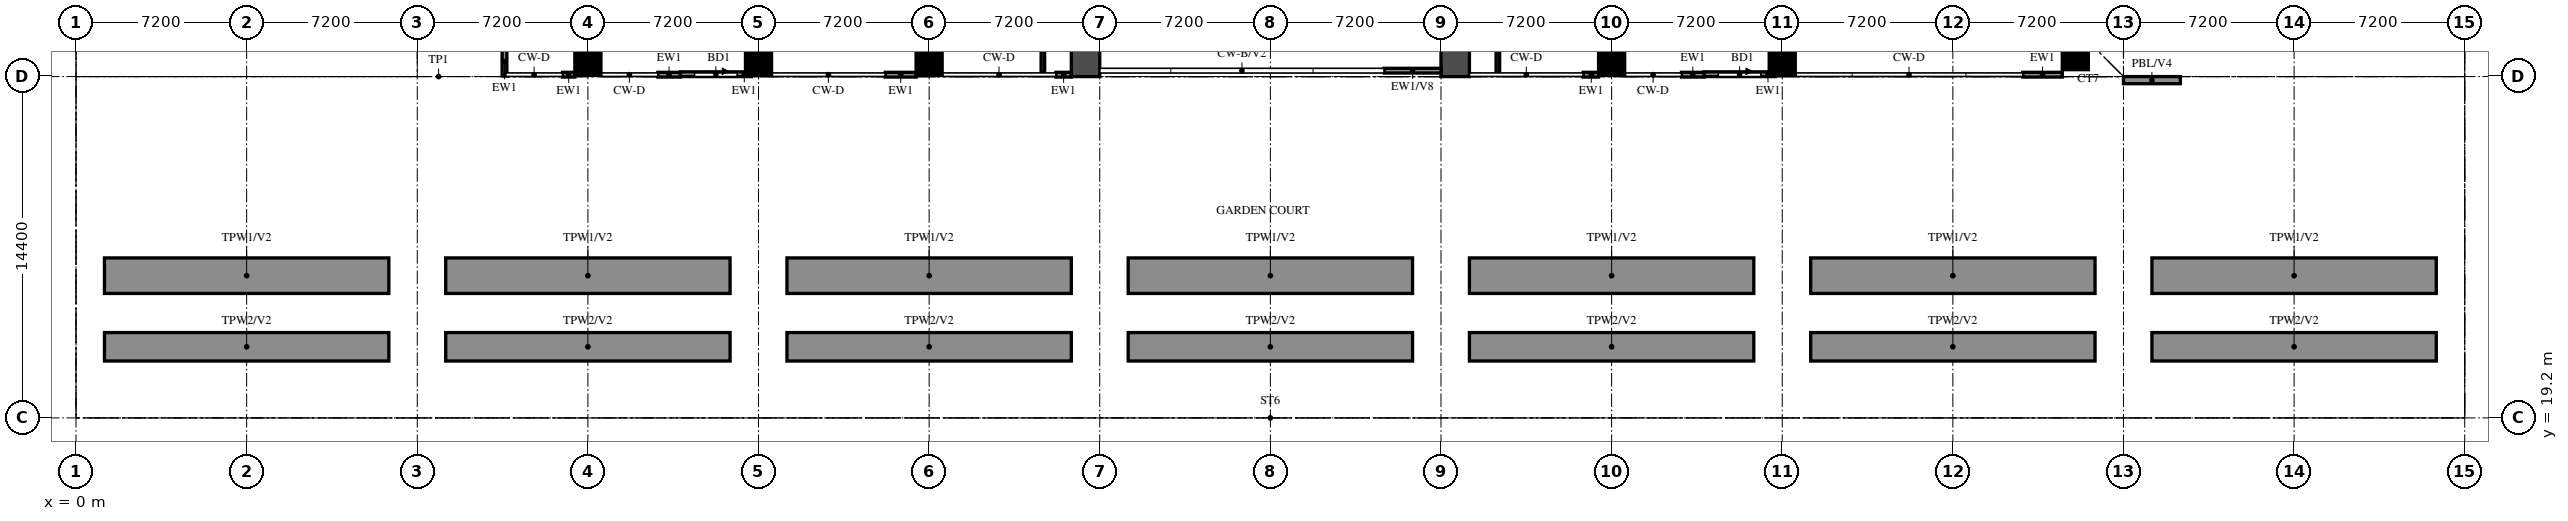
"""IFC4 building model, lengths in metres.
Left out: names, types, materials, properties, quantities, classifications, styles, units other than length and angle.
Written with IfcOpenShell. Run it as: python <this file> out.ifc"""

import sys

from ifc_helpers import new_model, si_unit, direction, frame, frame_2d, origin, origin_2d, place, context, subcontext, project, spatial, rectangle, extrude, source, transform, mapped, element, fill, save


model = new_model("IFC4")
c1 = context("Model", 3, precision=1e-05, world=origin(), true_north=direction((0.0, 1.0)))
c2 = subcontext(c1, "Body", "Model", "MODEL_VIEW")
j1 = project(units=[si_unit("LENGTHUNIT", "METRE"), si_unit("PLANEANGLEUNIT", "RADIAN")], contexts=[c1])
p1 = place(None, origin())
s1 = spatial("IfcSite", under=j1, at=p1, CompositionType="ELEMENT")
p2 = place(p1, origin())
s2 = spatial("IfcBuilding", under=s1, at=p2, CompositionType="ELEMENT")
p3 = place(p2, frame((0.0, 0.0, 27.0)))
s3 = spatial("IfcBuildingStorey", under=s2, at=p3, CompositionType="ELEMENT", Elevation=27.0)
m1 = source(origin(), c2, "Body", "SweptSolid", [
    extrude(rectangle(XDim=1.1, YDim=1.1, at=origin_2d()), origin(), (0.0, 0.0, 1.0), 3.18),
])
for number, where, z_axis, x_axis in (
    (1, (21.6, 34.2, 0.0), (0.0, 0.0, 1.0), (1.0, 0.0, 0.0)),
    (2, (28.8, 34.2, 0.0), (0.0, 0.0, 1.0), (1.0, 0.0, 0.0)),
    (3, (36.0, 34.2, 0.0), (0.0, 0.0, 1.0), (1.0, 0.0, 0.0)),
    (4, (64.8, 34.2, 0.0), (0.0, 0.0, 1.0), (1.0, 0.0, 0.0)),
    (5, (72.0, 34.2, 0.0), (0.0, 0.0, 1.0), (1.0, 0.0, 0.0)),
    (6, (84.367, 34.442, 0.0), (0.0, 0.0, 1.0), (1.0, 0.0, 0.0)),
):
    element("IfcColumn", number, at=place(p3, frame(where, z_axis=z_axis, x_axis=x_axis)), inside=s3, PredefinedType="COLUMN", context=c2, shape_type="MappedRepresentation", body=[
        mapped(m1, transform((0.0, 0.0, 0.0))),
    ])
for number, where, z_axis, x_axis in (
    (7, (42.6, 33.6, 0.0), (0.0, 0.0, 1.0), (0.0, 1.0, 0.0)),
    (8, (58.2, 33.6, 0.0), (0.0, 0.0, 1.0), (0.0, 1.0, 0.0)),
):
    element("IfcWall", number, at=place(p3, frame(where, z_axis=z_axis, x_axis=x_axis)), inside=s3, PredefinedType="SHEAR", context=c2, shape_type="SweptSolid", body=[
        extrude(rectangle(XDim=3.6, YDim=1.2, at=frame_2d((1.8, 0.0))), origin(), (0.0, 0.0, 1.0), 3.18),
    ])
p4 = place(p3, frame((18.08, 34.83, 0.0), z_axis=(0.0, 0.0, 1.0), x_axis=(0.0, -1.0, 0.0)))
e9 = element("IfcWall", 9, at=p4, inside=s3, PredefinedType="SOLIDWALL", context=c2, shape_type="SweptSolid", body=[
    extrude(rectangle(XDim=1.2, YDim=0.2, at=frame_2d((0.6, 0.0))), origin(), (0.0, 0.0, 1.0), 3.18),
])
p5 = place(p3, frame((25.5, 33.7, 0.0), z_axis=(0.0, 0.0, 1.0), x_axis=(1.0, 0.0, 0.0)))
e10 = element("IfcWall", 10, at=p5, inside=s3, PredefinedType="SOLIDWALL", context=c2, shape_type="SweptSolid", body=[
    extrude(rectangle(XDim=3.0, YDim=0.2, at=frame_2d((1.5, 0.0))), origin(), (0.0, 0.0, 1.0), 3.18),
])
p6 = place(p5, frame((0.6, 0.0, 0.0)))
e11 = element("IfcOpeningElement", 11, at=p6, cuts=e10, PredefinedType="OPENING", context=c2, shape_type="SweptSolid", body=[
    extrude(rectangle(XDim=1.8, YDim=2.4, at=frame_2d((0.9, 1.2))), frame((0.0, 0.11, 0.0), z_axis=(0.0, -1.0, 0.0), x_axis=(1.0, 0.0, 0.0)), (0.0, 0.0, 1.0), 0.22),
])
p7 = place(p3, frame((68.7, 33.7, 0.0), z_axis=(0.0, 0.0, 1.0), x_axis=(1.0, 0.0, 0.0)))
e12 = element("IfcWall", 12, at=p7, inside=s3, PredefinedType="SOLIDWALL", context=c2, shape_type="SweptSolid", body=[
    extrude(rectangle(XDim=3.0, YDim=0.2, at=frame_2d((1.5, 0.0))), origin(), (0.0, 0.0, 1.0), 3.18),
])
p8 = place(p7, frame((0.6, 0.0, 0.0)))
e13 = element("IfcOpeningElement", 13, at=p8, cuts=e12, PredefinedType="OPENING", context=c2, shape_type="SweptSolid", body=[
    extrude(rectangle(XDim=1.8, YDim=2.4, at=frame_2d((0.9, 1.2))), frame((0.0, 0.11, 0.0), z_axis=(0.0, -1.0, 0.0), x_axis=(1.0, 0.0, 0.0)), (0.0, 0.0, 1.0), 0.22),
])
p9 = place(p3, frame((20.53, 33.68, 0.0), z_axis=(0.0, 0.0, 1.0), x_axis=(1.0, 0.0, 0.0)))
e14 = element("IfcWall", 14, at=p9, inside=s3, PredefinedType="SOLIDWALL", context=c2, shape_type="SweptSolid", body=[
    extrude(rectangle(XDim=0.52, YDim=0.2, at=frame_2d((0.26, 0.0))), origin(), (0.0, 0.0, 1.0), 3.18),
])
p10 = place(p3, frame((24.55, 33.68, 0.0), z_axis=(0.0, 0.0, 1.0), x_axis=(1.0, 0.0, 0.0)))
e15 = element("IfcWall", 15, at=p10, inside=s3, PredefinedType="SOLIDWALL", context=c2, shape_type="SweptSolid", body=[
    extrude(rectangle(XDim=0.95, YDim=0.2, at=frame_2d((0.475, 0.0))), origin(), (0.0, 0.0, 1.0), 3.18),
])
p11 = place(p3, frame((34.15, 33.68, 0.0), z_axis=(0.0, 0.0, 1.0), x_axis=(1.0, 0.0, 0.0)))
e16 = element("IfcWall", 16, at=p11, inside=s3, PredefinedType="SOLIDWALL", context=c2, shape_type="SweptSolid", body=[
    extrude(rectangle(XDim=1.3, YDim=0.2, at=frame_2d((0.65, 0.0))), origin(), (0.0, 0.0, 1.0), 3.18),
])
for number, where, z_axis, x_axis in (
    (17, (41.35, 33.68, 0.0), (0.0, 0.0, 1.0), (1.0, 0.0, 0.0)),
    (18, (63.6, 33.68, 0.0), (0.0, 0.0, 1.0), (1.0, 0.0, 0.0)),
):
    element("IfcWall", number, at=place(p3, frame(where, z_axis=z_axis, x_axis=x_axis)), inside=s3, PredefinedType="SOLIDWALL", context=c2, shape_type="SweptSolid", body=[
        extrude(rectangle(XDim=0.65, YDim=0.2, at=frame_2d((0.325, 0.0))), origin(), (0.0, 0.0, 1.0), 3.18),
    ])
p12 = place(p3, frame((67.75, 33.68, 0.0), z_axis=(0.0, 0.0, 1.0), x_axis=(1.0, 0.0, 0.0)))
e19 = element("IfcWall", 19, at=p12, inside=s3, PredefinedType="SOLIDWALL", context=c2, shape_type="SweptSolid", body=[
    extrude(rectangle(XDim=0.95, YDim=0.2, at=frame_2d((0.475, 0.0))), origin(), (0.0, 0.0, 1.0), 3.18),
])
p13 = place(p3, frame((82.15, 33.68, 0.0), z_axis=(0.0, 0.0, 1.0), x_axis=(1.0, 0.0, 0.0)))
e20 = element("IfcWall", 20, at=p13, inside=s3, PredefinedType="SOLIDWALL", context=c2, shape_type="SweptSolid", body=[
    extrude(rectangle(XDim=1.667, YDim=0.2, at=frame_2d((0.834, 0.0))), origin(), (0.0, 0.0, 1.0), 3.18),
])
p14 = place(p3, frame((55.2, 33.85, 0.0), z_axis=(0.0, 0.0, 1.0), x_axis=(1.0, 0.0, 0.0)))
e21 = element("IfcWall", 21, at=p14, inside=s3, PredefinedType="SOLIDWALL", context=c2, shape_type="SweptSolid", body=[
    extrude(rectangle(XDim=2.4, YDim=0.2, at=frame_2d((1.2, 0.0))), origin(), (0.0, 0.0, 1.0), 1.98),
])
p15 = place(p3, frame((86.4, 33.45, -0.45), z_axis=(0.0, 0.0, 1.0), x_axis=(1.0, 0.0, 0.0)))
e22 = element("IfcWall", 22, at=p15, inside=s3, PredefinedType="SOLIDWALL", context=c2, shape_type="SweptSolid", body=[
    extrude(rectangle(XDim=2.4, YDim=0.3, at=frame_2d((1.2, 0.0))), origin(), (0.0, 0.0, 1.0), 3.63),
])
p16 = place(p3, frame((40.8, 33.77, 0.0), z_axis=(0.0, 0.0, 1.0), x_axis=(0.0, 1.0, 0.0)))
e23 = element("IfcWall", 23, at=p16, inside=s3, PredefinedType="PARTITIONING", context=c2, shape_type="SweptSolid", body=[
    extrude(rectangle(XDim=11.83, YDim=0.15, at=frame_2d((5.915, 0.0))), origin(), (0.0, 0.0, 1.0), 2.28),
])
p17 = place(p16, frame((5.28, 0.0, 0.0)))
e24 = element("IfcOpeningElement", 24, at=p17, cuts=e23, PredefinedType="OPENING", context=c2, shape_type="SweptSolid", body=[
    extrude(rectangle(XDim=1.1, YDim=2.1, at=frame_2d((0.55, 1.05))), frame((0.0, 0.085, 0.0), z_axis=(0.0, -1.0, 0.0), x_axis=(1.0, 0.0, 0.0)), (0.0, 0.0, 1.0), 0.17),
])
p18 = place(p3, frame((60.0, 33.77, 0.0), z_axis=(0.0, 0.0, 1.0), x_axis=(0.0, 1.0, 0.0)))
e25 = element("IfcWall", 25, at=p18, inside=s3, PredefinedType="PARTITIONING", context=c2, shape_type="SweptSolid", body=[
    extrude(rectangle(XDim=11.83, YDim=0.15, at=frame_2d((5.915, 0.0))), origin(), (0.0, 0.0, 1.0), 2.28),
])
p19 = place(p18, frame((5.28, 0.0, 0.0)))
e26 = element("IfcOpeningElement", 26, at=p19, cuts=e25, PredefinedType="OPENING", context=c2, shape_type="SweptSolid", body=[
    extrude(rectangle(XDim=1.1, YDim=2.1, at=frame_2d((0.55, 1.05))), frame((0.0, 0.085, 0.0), z_axis=(0.0, -1.0, 0.0), x_axis=(1.0, 0.0, 0.0)), (0.0, 0.0, 1.0), 0.17),
])
p20 = place(p3, frame((1.2, 22.2, 0.05), z_axis=(0.0, 0.0, 1.0), x_axis=(1.0, 0.0, 0.0)))
e27 = element("IfcWall", 27, at=p20, inside=s3, PredefinedType="SOLIDWALL", context=c2, shape_type="SweptSolid", body=[
    extrude(rectangle(XDim=12.0, YDim=1.2, at=frame_2d((6.0, 0.0))), origin(), (0.0, 0.0, 1.0), 0.45),
])
p21 = place(p3, frame((1.2, 25.2, 0.05), z_axis=(0.0, 0.0, 1.0), x_axis=(1.0, 0.0, 0.0)))
e28 = element("IfcWall", 28, at=p21, inside=s3, PredefinedType="SOLIDWALL", context=c2, shape_type="SweptSolid", body=[
    extrude(rectangle(XDim=12.0, YDim=1.5, at=frame_2d((6.0, 0.0))), origin(), (0.0, 0.0, 1.0), 0.9),
])
p22 = place(p3, frame((15.6, 22.2, 0.05), z_axis=(0.0, 0.0, 1.0), x_axis=(1.0, 0.0, 0.0)))
e29 = element("IfcWall", 29, at=p22, inside=s3, PredefinedType="SOLIDWALL", context=c2, shape_type="SweptSolid", body=[
    extrude(rectangle(XDim=12.0, YDim=1.2, at=frame_2d((6.0, 0.0))), origin(), (0.0, 0.0, 1.0), 0.45),
])
p23 = place(p3, frame((15.6, 25.2, 0.05), z_axis=(0.0, 0.0, 1.0), x_axis=(1.0, 0.0, 0.0)))
e30 = element("IfcWall", 30, at=p23, inside=s3, PredefinedType="SOLIDWALL", context=c2, shape_type="SweptSolid", body=[
    extrude(rectangle(XDim=12.0, YDim=1.5, at=frame_2d((6.0, 0.0))), origin(), (0.0, 0.0, 1.0), 0.9),
])
p24 = place(p3, frame((30.0, 22.2, 0.05), z_axis=(0.0, 0.0, 1.0), x_axis=(1.0, 0.0, 0.0)))
e31 = element("IfcWall", 31, at=p24, inside=s3, PredefinedType="SOLIDWALL", context=c2, shape_type="SweptSolid", body=[
    extrude(rectangle(XDim=12.0, YDim=1.2, at=frame_2d((6.0, 0.0))), origin(), (0.0, 0.0, 1.0), 0.45),
])
p25 = place(p3, frame((30.0, 25.2, 0.05), z_axis=(0.0, 0.0, 1.0), x_axis=(1.0, 0.0, 0.0)))
e32 = element("IfcWall", 32, at=p25, inside=s3, PredefinedType="SOLIDWALL", context=c2, shape_type="SweptSolid", body=[
    extrude(rectangle(XDim=12.0, YDim=1.5, at=frame_2d((6.0, 0.0))), origin(), (0.0, 0.0, 1.0), 0.9),
])
p26 = place(p3, frame((44.4, 22.2, 0.05), z_axis=(0.0, 0.0, 1.0), x_axis=(1.0, 0.0, 0.0)))
e33 = element("IfcWall", 33, at=p26, inside=s3, PredefinedType="SOLIDWALL", context=c2, shape_type="SweptSolid", body=[
    extrude(rectangle(XDim=12.0, YDim=1.2, at=frame_2d((6.0, 0.0))), origin(), (0.0, 0.0, 1.0), 0.45),
])
p27 = place(p3, frame((44.4, 25.2, 0.05), z_axis=(0.0, 0.0, 1.0), x_axis=(1.0, 0.0, 0.0)))
e34 = element("IfcWall", 34, at=p27, inside=s3, PredefinedType="SOLIDWALL", context=c2, shape_type="SweptSolid", body=[
    extrude(rectangle(XDim=12.0, YDim=1.5, at=frame_2d((6.0, 0.0))), origin(), (0.0, 0.0, 1.0), 0.9),
])
p28 = place(p3, frame((58.8, 22.2, 0.05), z_axis=(0.0, 0.0, 1.0), x_axis=(1.0, 0.0, 0.0)))
e35 = element("IfcWall", 35, at=p28, inside=s3, PredefinedType="SOLIDWALL", context=c2, shape_type="SweptSolid", body=[
    extrude(rectangle(XDim=12.0, YDim=1.2, at=frame_2d((6.0, 0.0))), origin(), (0.0, 0.0, 1.0), 0.45),
])
p29 = place(p3, frame((58.8, 25.2, 0.05), z_axis=(0.0, 0.0, 1.0), x_axis=(1.0, 0.0, 0.0)))
e36 = element("IfcWall", 36, at=p29, inside=s3, PredefinedType="SOLIDWALL", context=c2, shape_type="SweptSolid", body=[
    extrude(rectangle(XDim=12.0, YDim=1.5, at=frame_2d((6.0, 0.0))), origin(), (0.0, 0.0, 1.0), 0.9),
])
p30 = place(p3, frame((73.2, 22.2, 0.05), z_axis=(0.0, 0.0, 1.0), x_axis=(1.0, 0.0, 0.0)))
e37 = element("IfcWall", 37, at=p30, inside=s3, PredefinedType="SOLIDWALL", context=c2, shape_type="SweptSolid", body=[
    extrude(rectangle(XDim=12.0, YDim=1.2, at=frame_2d((6.0, 0.0))), origin(), (0.0, 0.0, 1.0), 0.45),
])
p31 = place(p3, frame((73.2, 25.2, 0.05), z_axis=(0.0, 0.0, 1.0), x_axis=(1.0, 0.0, 0.0)))
e38 = element("IfcWall", 38, at=p31, inside=s3, PredefinedType="SOLIDWALL", context=c2, shape_type="SweptSolid", body=[
    extrude(rectangle(XDim=12.0, YDim=1.5, at=frame_2d((6.0, 0.0))), origin(), (0.0, 0.0, 1.0), 0.9),
])
p32 = place(p3, frame((87.6, 22.2, 0.05), z_axis=(0.0, 0.0, 1.0), x_axis=(1.0, 0.0, 0.0)))
e39 = element("IfcWall", 39, at=p32, inside=s3, PredefinedType="SOLIDWALL", context=c2, shape_type="SweptSolid", body=[
    extrude(rectangle(XDim=12.0, YDim=1.2, at=frame_2d((6.0, 0.0))), origin(), (0.0, 0.0, 1.0), 0.45),
])
p33 = place(p3, frame((87.6, 25.2, 0.05), z_axis=(0.0, 0.0, 1.0), x_axis=(1.0, 0.0, 0.0)))
e40 = element("IfcWall", 40, at=p33, inside=s3, PredefinedType="SOLIDWALL", context=c2, shape_type="SweptSolid", body=[
    extrude(rectangle(XDim=12.0, YDim=1.5, at=frame_2d((6.0, 0.0))), origin(), (0.0, 0.0, 1.0), 0.9),
])
p34 = place(p6, origin())
e41 = element("IfcDoor", 41, at=p34, inside=s3, OperationType="DOUBLE_DOOR_SLIDING", PredefinedType="DOOR", context=c2, shape_type="SweptSolid", body=[
    extrude(rectangle(XDim=1.8, YDim=2.4, at=frame_2d((0.9, 1.2))), frame((0.0, 0.025, 0.0), z_axis=(0.0, -1.0, 0.0), x_axis=(1.0, 0.0, 0.0)), (0.0, 0.0, 1.0), 0.05),
])
fill(e11, e41)
p35 = place(p8, origin())
e42 = element("IfcDoor", 42, at=p35, inside=s3, OperationType="DOUBLE_DOOR_SLIDING", PredefinedType="DOOR", context=c2, shape_type="SweptSolid", body=[
    extrude(rectangle(XDim=1.8, YDim=2.4, at=frame_2d((0.9, 1.2))), frame((0.0, 0.025, 0.0), z_axis=(0.0, -1.0, 0.0), x_axis=(1.0, 0.0, 0.0)), (0.0, 0.0, 1.0), 0.05),
])
fill(e13, e42)
save(model, sys.argv[1])
